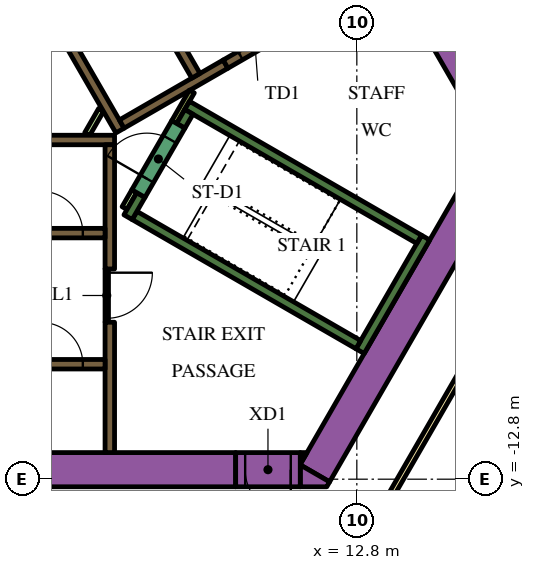
"""IFC4 building model, lengths in metres.
Left out: names, types, materials, properties, quantities, classifications, styles, units other than length and angle.
Written with IfcOpenShell. Run it as: python <this file> out.ifc"""

import sys

from ifc_helpers import new_model, si_unit, direction, frame, frame_2d, origin, place, context, subcontext, project, spatial, polyline, rectangle, outline, extrude, element, fill, save


model = new_model("IFC4")
c1 = context("Model", 3, precision=1e-05, world=origin(), true_north=direction((0.0, 1.0)))
c2 = subcontext(c1, "Body", "Model", "MODEL_VIEW")
j1 = project(units=[si_unit("LENGTHUNIT", "METRE"), si_unit("PLANEANGLEUNIT", "RADIAN")], contexts=[c1])
p1 = place(None, origin())
s1 = spatial("IfcSite", under=j1, at=p1, CompositionType="ELEMENT")
p2 = place(p1, origin())
s2 = spatial("IfcBuilding", under=s1, at=p2, CompositionType="ELEMENT")
p3 = place(p2, frame((0.0, 0.0, 107.1)))
s3 = spatial("IfcBuildingStorey", under=s2, at=p3, CompositionType="ELEMENT", Elevation=107.1)
p4 = place(p3, frame((6.711, 13.476, 0.0), z_axis=(0.0, 0.0, 1.0), x_axis=(0.500002723396, -0.866023831425, 0.0)))
e1 = element("IfcWall", 1, at=p4, inside=s3, PredefinedType="SOLIDWALL", context=c2, shape_type="SweptSolid", body=[
    extrude(rectangle(XDim=20.334, YDim=0.9, at=frame_2d((10.167, 0.0))), origin(), (0.0, 0.0, 1.0), 3.9),
])
p5 = place(p3, frame((11.695, -12.644, 0.0), z_axis=(0.0, 0.0, 1.0), x_axis=(0.500010229568, 0.86601949766, 0.0)))
e2 = element("IfcWall", 2, at=p5, inside=s3, PredefinedType="SOLIDWALL", context=c2, shape_type="SweptSolid", body=[
    extrude(rectangle(XDim=9.326, YDim=0.9, at=frame_2d((4.663, 0.0))), origin(), (0.0, 0.0, 1.0), 3.9),
])
p6 = place(p3, origin())
e3 = element("IfcWall", 3, at=p6, inside=s3, PredefinedType="SOLIDWALL", context=c2, shape_type="SweptSolid", body=[
    extrude(outline(polyline([(12.009, -13.0), (11.312, -13.0), (11.312, -12.425), (12.083, -12.871), (12.009, -13.0)])), origin(), (0.0, 0.0, 1.0), 3.9),
])
e4 = element("IfcWall", 4, at=p6, inside=s3, PredefinedType="SOLIDWALL", context=c2, shape_type="SweptSolid", body=[
    extrude(outline(polyline([(11.489, -12.1), (11.312, -12.407), (11.312, -12.1), (11.489, -12.1)])), origin(), (0.0, 0.0, 1.0), 3.9),
])
p7 = place(p3, frame((-12.019, -12.55, 0.0), z_axis=(0.0, 0.0, 1.0), x_axis=(1.0, 0.0, 0.0)))
e5 = element("IfcWall", 5, at=p7, inside=s3, PredefinedType="SOLIDWALL", context=c2, shape_type="SweptSolid", body=[
    extrude(rectangle(XDim=21.63, YDim=0.9, at=frame_2d((10.815, 0.0))), origin(), (0.0, 0.0, 1.0), 3.9),
])
p8 = place(p3, frame((12.885, -9.431, 0.0), z_axis=(0.0, 0.0, 1.0), x_axis=(0.500020560727, 0.866013532718, 0.0)))
e6 = element("IfcWall", 6, at=p8, inside=s3, PredefinedType="SOLIDWALL", context=c2, shape_type="SweptSolid", body=[
    extrude(rectangle(XDim=3.45, YDim=0.25, at=frame_2d((1.725, 0.0))), origin(), (0.0, 0.0, 1.0), 3.9),
])
p9 = place(p3, frame((12.84, -9.261, 0.0), z_axis=(0.0, 0.0, 1.0), x_axis=(-0.866013990052, 0.500019768644, 0.0)))
e7 = element("IfcWall", 7, at=p9, inside=s3, PredefinedType="SOLIDWALL", context=c2, shape_type="SweptSolid", body=[
    extrude(rectangle(XDim=6.8, YDim=0.25, at=frame_2d((3.4, 0.0))), origin(), (0.0, 0.0, 1.0), 3.9),
])
p10 = place(p3, frame((6.78, -5.906, 0.0), z_axis=(0.0, 0.0, 1.0), x_axis=(0.500223362819, 0.865896406789, 0.0)))
e8 = element("IfcWall", 8, at=p10, inside=s3, PredefinedType="SOLIDWALL", context=c2, shape_type="SweptSolid", body=[
    extrude(rectangle(XDim=0.675, YDim=0.25, at=frame_2d((0.337, 0.0))), origin(), (0.0, 0.0, 1.0), 3.9),
])
p11 = place(p3, frame((8.334, -2.964, 0.0), z_axis=(0.0, 0.0, 1.0), x_axis=(0.866016039709, -0.500016218704, 0.0)))
e9 = element("IfcWall", 9, at=p11, inside=s3, PredefinedType="SOLIDWALL", context=c2, shape_type="SweptSolid", body=[
    extrude(rectangle(XDim=7.05, YDim=0.25, at=frame_2d((3.525, 0.0))), origin(), (0.0, 0.0, 1.0), 3.9),
])
p12 = place(p3, frame((8.168, -3.503, 0.0), z_axis=(0.0, 0.0, 1.0), x_axis=(0.49972245349, 0.866185586049, 0.0)))
e10 = element("IfcWall", 10, at=p12, inside=s3, PredefinedType="SOLIDWALL", context=c2, shape_type="SweptSolid", body=[
    extrude(rectangle(XDim=0.425, YDim=0.25, at=frame_2d((0.212, 0.0))), origin(), (0.0, 0.0, 1.0), 3.9),
])
p13 = place(p3, frame((-5.545, -3.875, 0.0), z_axis=(0.0, 0.0, 1.0), x_axis=(1.0, 0.0, 0.0)))
e11 = element("IfcWall", 11, at=p13, inside=s3, PredefinedType="SOLIDWALL", context=c2, shape_type="SweptSolid", body=[
    extrude(rectangle(XDim=11.97, YDim=0.25, at=frame_2d((5.985, 0.0))), origin(), (0.0, 0.0, 1.0), 3.9),
])
p14 = place(p3, frame((6.3, -8.67, 0.0), z_axis=(0.0, 0.0, 1.0), x_axis=(0.0, -1.0, 0.0)))
e12 = element("IfcWall", 12, at=p14, inside=s3, PredefinedType="SOLIDWALL", context=c2, shape_type="SweptSolid", body=[
    extrude(rectangle(XDim=3.43, YDim=0.25, at=frame_2d((1.715, 0.0))), origin(), (0.0, 0.0, 1.0), 3.9),
])
p15 = place(p3, frame((6.3, -7.268, 0.0), z_axis=(0.0, 0.0, 1.0), x_axis=(0.0, 1.0, 0.0)))
e13 = element("IfcWall", 13, at=p15, inside=s3, PredefinedType="SOLIDWALL", context=c2, shape_type="SweptSolid", body=[
    extrude(rectangle(XDim=3.268, YDim=0.25, at=frame_2d((1.634, 0.0))), origin(), (0.0, 0.0, 1.0), 3.9),
])
e14 = element("IfcWall", 14, at=p6, inside=s3, PredefinedType="SOLIDWALL", context=c2, shape_type="SweptSolid", body=[
    extrude(outline(polyline([(0.566, 6.725), (0.566, 6.875), (0.566, 6.875), (0.565, 6.875), (0.361, 6.875), (0.035, 7.439), (0.252, 7.564), (0.377, 7.348), (6.552, -3.348), (6.677, -3.564), (6.46, -3.689), (0.448, 6.725), (0.565, 6.725), (0.566, 6.725), (0.566, 6.725)])), origin(), (0.0, 0.0, 1.0), 3.9),
])
p16 = place(p3, frame((6.614, -3.456, 0.0), z_axis=(0.0, 0.0, 1.0), x_axis=(0.86602447079, 0.500001615989, 0.0)))
e15 = element("IfcWall", 15, at=p16, inside=s3, PredefinedType="SOLIDWALL", context=c2, shape_type="SweptSolid", body=[
    extrude(rectangle(XDim=3.154, YDim=0.25, at=frame_2d((1.577, 0.0))), origin(), (0.0, 0.0, 1.0), 3.9),
])
p17 = place(p3, frame((6.945, -5.222, 0.0), z_axis=(0.0, 0.0, 1.0), x_axis=(-0.499818422106, -0.866130212453, 0.0)))
e16 = element("IfcWall", 16, at=p17, inside=s3, PredefinedType="PARTITIONING", context=c2, shape_type="SweptSolid", body=[
    extrude(rectangle(XDim=0.514, YDim=0.15, at=frame_2d((0.257, 0.0))), origin(), (0.0, 0.0, 1.0), 2.75),
])
p18 = place(p3, frame((5.705, -3.718, 0.0), z_axis=(0.0, 0.0, 1.0), x_axis=(0.499962090823, 0.866047289552, 0.0)))
e17 = element("IfcWall", 17, at=p18, inside=s3, PredefinedType="PARTITIONING", context=c2, shape_type="SweptSolid", body=[
    extrude(rectangle(XDim=0.735, YDim=0.15, at=frame_2d((0.367, 0.0))), origin(), (0.0, 0.0, 1.0), 2.75),
])
p19 = place(p3, frame((8.459, -2.599, 0.0), z_axis=(0.0, 0.0, 1.0), x_axis=(-0.500041054325, -0.866001699761, 0.0)))
e18 = element("IfcWall", 18, at=p19, inside=s3, PredefinedType="PARTITIONING", context=c2, shape_type="SweptSolid", body=[
    extrude(rectangle(XDim=0.929, YDim=0.15, at=frame_2d((0.464, 0.0))), origin(), (0.0, 0.0, 1.0), 3.9),
])
p20 = place(p3, frame((-6.175, -9.775, 0.0), z_axis=(0.0, 0.0, 1.0), x_axis=(1.0, 0.0, 0.0)))
e19 = element("IfcWall", 19, at=p20, inside=s3, PredefinedType="SOLIDWALL", context=c2, shape_type="SweptSolid", body=[
    extrude(rectangle(XDim=12.35, YDim=0.25, at=frame_2d((6.175, 0.0))), origin(), (0.0, 0.0, 1.0), 3.9),
])
p21 = place(p20, frame((0.585, 0.0, 0.0)))
e20 = element("IfcOpeningElement", 20, at=p21, cuts=e19, PredefinedType="OPENING", context=c2, shape_type="SweptSolid", body=[
    extrude(rectangle(XDim=1.1, YDim=2.1, at=frame_2d((0.55, 1.05))), frame((0.0, 0.135, 0.0), z_axis=(0.0, -1.0, 0.0), x_axis=(1.0, 0.0, 0.0)), (0.0, 0.0, 1.0), 0.27),
])
p22 = place(p20, frame((3.105, 0.0, 0.0)))
e21 = element("IfcOpeningElement", 21, at=p22, cuts=e19, PredefinedType="OPENING", context=c2, shape_type="SweptSolid", body=[
    extrude(rectangle(XDim=1.1, YDim=2.1, at=frame_2d((0.55, 1.05))), frame((0.0, 0.135, 0.0), z_axis=(0.0, -1.0, 0.0), x_axis=(1.0, 0.0, 0.0)), (0.0, 0.0, 1.0), 0.27),
])
p23 = place(p20, frame((5.625, 0.0, 0.0)))
e22 = element("IfcOpeningElement", 22, at=p23, cuts=e19, PredefinedType="OPENING", context=c2, shape_type="SweptSolid", body=[
    extrude(rectangle(XDim=1.1, YDim=2.1, at=frame_2d((0.55, 1.05))), frame((0.0, 0.135, 0.0), z_axis=(0.0, -1.0, 0.0), x_axis=(1.0, 0.0, 0.0)), (0.0, 0.0, 1.0), 0.27),
])
p24 = place(p20, frame((8.145, 0.0, 0.0)))
e23 = element("IfcOpeningElement", 23, at=p24, cuts=e19, PredefinedType="OPENING", context=c2, shape_type="SweptSolid", body=[
    extrude(rectangle(XDim=1.1, YDim=2.1, at=frame_2d((0.55, 1.05))), frame((0.0, 0.135, 0.0), z_axis=(0.0, -1.0, 0.0), x_axis=(1.0, 0.0, 0.0)), (0.0, 0.0, 1.0), 0.27),
])
p25 = place(p20, frame((10.665, 0.0, 0.0)))
e24 = element("IfcOpeningElement", 24, at=p25, cuts=e19, PredefinedType="OPENING", context=c2, shape_type="SweptSolid", body=[
    extrude(rectangle(XDim=1.1, YDim=2.1, at=frame_2d((0.55, 1.05))), frame((0.0, 0.135, 0.0), z_axis=(0.0, -1.0, 0.0), x_axis=(1.0, 0.0, 0.0)), (0.0, 0.0, 1.0), 0.27),
])
p26 = place(p3, frame((-6.175, -6.325, 0.0), z_axis=(0.0, 0.0, 1.0), x_axis=(1.0, 0.0, 0.0)))
e25 = element("IfcWall", 25, at=p26, inside=s3, PredefinedType="SOLIDWALL", context=c2, shape_type="SweptSolid", body=[
    extrude(rectangle(XDim=12.35, YDim=0.25, at=frame_2d((6.175, 0.0))), origin(), (0.0, 0.0, 1.0), 3.9),
])
p27 = place(p26, frame((3.205, 0.0, 0.0)))
e26 = element("IfcOpeningElement", 26, at=p27, cuts=e25, PredefinedType="OPENING", context=c2, shape_type="SweptSolid", body=[
    extrude(rectangle(XDim=0.9, YDim=2.1, at=frame_2d((0.45, 1.05))), frame((0.0, 0.135, 0.0), z_axis=(0.0, -1.0, 0.0), x_axis=(1.0, 0.0, 0.0)), (0.0, 0.0, 1.0), 0.27),
])
p28 = place(p26, frame((8.145, 0.0, 0.0)))
e27 = element("IfcOpeningElement", 27, at=p28, cuts=e25, PredefinedType="OPENING", context=c2, shape_type="SweptSolid", body=[
    extrude(rectangle(XDim=1.1, YDim=2.1, at=frame_2d((0.55, 1.05))), frame((0.0, 0.135, 0.0), z_axis=(0.0, -1.0, 0.0), x_axis=(1.0, 0.0, 0.0)), (0.0, 0.0, 1.0), 0.27),
])
p29 = place(p26, frame((10.665, 0.0, 0.0)))
e28 = element("IfcOpeningElement", 28, at=p29, cuts=e25, PredefinedType="OPENING", context=c2, shape_type="SweptSolid", body=[
    extrude(rectangle(XDim=1.1, YDim=2.1, at=frame_2d((0.55, 1.05))), frame((0.0, 0.135, 0.0), z_axis=(0.0, -1.0, 0.0), x_axis=(1.0, 0.0, 0.0)), (0.0, 0.0, 1.0), 0.27),
])
p30 = place(p3, frame((8.565, -2.185, 0.0), z_axis=(0.0, 0.0, 1.0), x_axis=(-0.499997954832, 0.866026584559, 0.0)))
e29 = element("IfcWall", 29, at=p30, inside=s3, PredefinedType="SOLIDWALL", context=c2, shape_type="SweptSolid", body=[
    extrude(rectangle(XDim=12.35, YDim=0.25, at=frame_2d((6.175, 0.0))), origin(), (0.0, 0.0, 1.0), 3.9),
])
p31 = place(p30, frame((5.725, 0.0, 0.0)))
e30 = element("IfcOpeningElement", 30, at=p31, cuts=e29, PredefinedType="OPENING", context=c2, shape_type="SweptSolid", body=[
    extrude(rectangle(XDim=0.9, YDim=2.1, at=frame_2d((0.45, 1.05))), frame((0.0, 0.135, 0.0), z_axis=(0.0, -1.0, 0.0), x_axis=(1.0, 0.0, 0.0)), (0.0, 0.0, 1.0), 0.27),
])
p32 = place(p3, frame((7.053, -5.284, 0.0), z_axis=(0.0, 0.0, 1.0), x_axis=(0.500078061341, 0.865980330357, 0.0)))
e31 = element("IfcWall", 31, at=p32, inside=s3, PredefinedType="SOLIDWALL", context=c2, shape_type="SweptSolid", body=[
    extrude(rectangle(XDim=2.1, YDim=0.4, at=frame_2d((1.05, 0.0))), origin(), (0.0, 0.0, 1.0), 3.9),
])
p33 = place(p32, frame((0.45, 0.0, 0.0)))
e32 = element("IfcOpeningElement", 32, at=p33, cuts=e31, PredefinedType="OPENING", context=c2, shape_type="SweptSolid", body=[
    extrude(rectangle(XDim=1.2, YDim=2.1, at=frame_2d((0.6, 1.05))), frame((0.0, 0.21, 0.0), z_axis=(0.0, -1.0, 0.0), x_axis=(1.0, 0.0, 0.0)), (0.0, 0.0, 1.0), 0.42),
])
p34 = place(p3, frame((9.346, -1.879, 0.0), z_axis=(0.0, 0.0, 1.0), x_axis=(0.866047807691, 0.499961193289, 0.0)))
e33 = element("IfcWall", 33, at=p34, inside=s3, PredefinedType="SOLIDWALL", context=c2, shape_type="SweptSolid", body=[
    extrude(rectangle(XDim=1.8, YDim=0.25, at=frame_2d((0.9, 0.0))), origin(), (0.0, 0.0, 1.0), 3.9),
])
p35 = place(p34, frame((0.45, 0.0, 0.0)))
e34 = element("IfcOpeningElement", 34, at=p35, cuts=e33, PredefinedType="OPENING", context=c2, shape_type="SweptSolid", body=[
    extrude(rectangle(XDim=0.9, YDim=2.1, at=frame_2d((0.45, 1.05))), frame((0.0, 0.135, 0.0), z_axis=(0.0, -1.0, 0.0), x_axis=(1.0, 0.0, 0.0)), (0.0, 0.0, 1.0), 0.27),
])
p36 = place(p3, frame((6.22, -7.266, 0.0), z_axis=(0.0, 0.0, 1.0), x_axis=(0.0, -1.0, 0.0)))
e35 = element("IfcWall", 35, at=p36, inside=s3, PredefinedType="PARTITIONING", context=c2, shape_type="SweptSolid", body=[
    extrude(rectangle(XDim=1.4, YDim=0.09, at=frame_2d((0.7, 0.0))), origin(), (0.0, 0.0, 1.0), 2.75),
])
p37 = place(p36, frame((0.1, 0.0, 0.0)))
e36 = element("IfcOpeningElement", 36, at=p37, cuts=e35, PredefinedType="OPENING", context=c2, shape_type="SweptSolid", body=[
    extrude(rectangle(XDim=1.2, YDim=2.1, at=frame_2d((0.6, 1.05))), frame((0.0, 0.055, 0.0), z_axis=(0.0, -1.0, 0.0), x_axis=(1.0, 0.0, 0.0)), (0.0, 0.0, 1.0), 0.11),
])
p38 = place(p3, frame((11.312, -12.55, 0.0), z_axis=(0.0, 0.0, 1.0), x_axis=(-1.0, 0.0, 0.0)))
e37 = element("IfcWall", 37, at=p38, inside=s3, PredefinedType="SOLIDWALL", context=c2, shape_type="SweptSolid", body=[
    extrude(rectangle(XDim=1.7, YDim=0.9, at=frame_2d((0.85, 0.0))), origin(), (0.0, 0.0, 1.0), 3.9),
])
p39 = place(p38, frame((0.25, 0.0, 0.0)))
e38 = element("IfcOpeningElement", 38, at=p39, cuts=e37, PredefinedType="OPENING", context=c2, shape_type="SweptSolid", body=[
    extrude(rectangle(XDim=1.2, YDim=2.1, at=frame_2d((0.6, 1.05))), frame((0.0, 0.46, 0.0), z_axis=(0.0, -1.0, 0.0), x_axis=(1.0, 0.0, 0.0)), (0.0, 0.0, 1.0), 0.92),
])
p40 = place(p3, frame((6.163, 18.475, 0.0), z_axis=(0.0, 0.0, 1.0), x_axis=(0.500001317485, -0.866024643133, 0.0)))
e39 = element("IfcWall", 39, at=p40, inside=s3, PredefinedType="PARTITIONING", context=c2, shape_type="SweptSolid", body=[
    extrude(rectangle(XDim=25.767, YDim=0.15, at=frame_2d((12.883, 0.0))), origin(), (0.0, 0.0, 1.0), 2.75),
])
p41 = place(p40, frame((24.241, 0.0, 0.0)))
e40 = element("IfcOpeningElement", 40, at=p41, cuts=e39, PredefinedType="OPENING", context=c2, shape_type="SweptSolid", body=[
    extrude(rectangle(XDim=1.0, YDim=2.1, at=frame_2d((0.5, 1.05))), frame((0.0, 0.085, 0.0), z_axis=(0.0, -1.0, 0.0), x_axis=(1.0, 0.0, 0.0)), (0.0, 0.0, 1.0), 0.17),
])
p42 = place(p40, frame((13.144, 0.0, 0.0)))
e41 = element("IfcOpeningElement", 41, at=p42, cuts=e39, PredefinedType="OPENING", context=c2, shape_type="SweptSolid", body=[
    extrude(rectangle(XDim=1.0, YDim=2.1, at=frame_2d((0.5, 1.05))), frame((0.0, 0.085, 0.0), z_axis=(0.0, -1.0, 0.0), x_axis=(1.0, 0.0, 0.0)), (0.0, 0.0, 1.0), 0.17),
])
p43 = place(p40, frame((10.874, 0.0, 0.0)))
e42 = element("IfcOpeningElement", 42, at=p43, cuts=e39, PredefinedType="OPENING", context=c2, shape_type="SweptSolid", body=[
    extrude(rectangle(XDim=0.9, YDim=2.1, at=frame_2d((0.45, 1.05))), frame((0.0, 0.085, 0.0), z_axis=(0.0, -1.0, 0.0), x_axis=(1.0, 0.0, 0.0)), (0.0, 0.0, 1.0), 0.17),
])
p44 = place(p40, frame((3.718, 0.0, 0.0)))
e43 = element("IfcOpeningElement", 43, at=p44, cuts=e39, PredefinedType="OPENING", context=c2, shape_type="SweptSolid", body=[
    extrude(rectangle(XDim=1.0, YDim=2.1, at=frame_2d((0.5, 1.05))), frame((0.0, 0.085, 0.0), z_axis=(0.0, -1.0, 0.0), x_axis=(1.0, 0.0, 0.0)), (0.0, 0.0, 1.0), 0.17),
])
p45 = place(p40, frame((2.411, 0.0, 0.0)))
e44 = element("IfcOpeningElement", 44, at=p45, cuts=e39, PredefinedType="OPENING", context=c2, shape_type="SweptSolid", body=[
    extrude(rectangle(XDim=1.0, YDim=2.1, at=frame_2d((0.5, 1.05))), frame((0.0, 0.085, 0.0), z_axis=(0.0, -1.0, 0.0), x_axis=(1.0, 0.0, 0.0)), (0.0, 0.0, 1.0), 0.17),
])
p46 = place(p3, frame((15.587, -9.952, 0.0), z_axis=(0.0, 0.0, 1.0), x_axis=(-0.500016618951, -0.866015808616, 0.0)))
e45 = element("IfcWall", 45, at=p46, inside=s3, PredefinedType="PARTITIONING", context=c2, shape_type="SweptSolid", body=[
    extrude(rectangle(XDim=5.268, YDim=0.15, at=frame_2d((2.634, 0.0))), origin(), (0.0, 0.0, 1.0), 2.75),
])
p47 = place(p25, origin())
e46 = element("IfcDoor", 46, at=p47, inside=s3, OperationType="DOUBLE_DOOR_SLIDING", PredefinedType="DOOR", context=c2, shape_type="SweptSolid", body=[
    extrude(rectangle(XDim=1.1, YDim=2.1, at=frame_2d((0.55, 1.05))), frame((0.0, 0.025, 0.0), z_axis=(0.0, -1.0, 0.0), x_axis=(1.0, 0.0, 0.0)), (0.0, 0.0, 1.0), 0.05),
])
fill(e24, e46)
p48 = place(p29, origin())
e47 = element("IfcDoor", 47, at=p48, inside=s3, OperationType="DOUBLE_DOOR_SLIDING", PredefinedType="DOOR", context=c2, shape_type="SweptSolid", body=[
    extrude(rectangle(XDim=1.1, YDim=2.1, at=frame_2d((0.55, 1.05))), frame((0.0, 0.025, 0.0), z_axis=(0.0, -1.0, 0.0), x_axis=(1.0, 0.0, 0.0)), (0.0, 0.0, 1.0), 0.05),
])
fill(e28, e47)
p49 = place(p33, origin())
e48 = element("IfcDoor", 48, at=p49, inside=s3, OperationType="SINGLE_SWING_LEFT", PredefinedType="DOOR", context=c2, shape_type="SweptSolid", body=[
    extrude(rectangle(XDim=1.2, YDim=2.1, at=frame_2d((0.6, 1.05))), frame((0.0, 0.025, 0.0), z_axis=(0.0, -1.0, 0.0), x_axis=(1.0, 0.0, 0.0)), (0.0, 0.0, 1.0), 0.05),
])
fill(e32, e48)
p50 = place(p35, origin())
e49 = element("IfcDoor", 49, at=p50, inside=s3, OperationType="SINGLE_SWING_LEFT", PredefinedType="DOOR", context=c2, shape_type="SweptSolid", body=[
    extrude(rectangle(XDim=0.9, YDim=2.1, at=frame_2d((0.45, 1.05))), frame((0.0, 0.025, 0.0), z_axis=(0.0, -1.0, 0.0), x_axis=(1.0, 0.0, 0.0)), (0.0, 0.0, 1.0), 0.05),
])
fill(e34, e49)
p51 = place(p37, origin())
e50 = element("IfcDoor", 50, at=p51, inside=s3, OperationType="SINGLE_SWING_LEFT", PredefinedType="DOOR", context=c2, shape_type="SweptSolid", body=[
    extrude(rectangle(XDim=1.2, YDim=2.1, at=frame_2d((0.6, 1.05))), frame((0.0, 0.025, 0.0), z_axis=(0.0, -1.0, 0.0), x_axis=(1.0, 0.0, 0.0)), (0.0, 0.0, 1.0), 0.05),
])
fill(e36, e50)
p52 = place(p39, origin())
e51 = element("IfcDoor", 51, at=p52, inside=s3, OperationType="SINGLE_SWING_LEFT", PredefinedType="DOOR", context=c2, shape_type="SweptSolid", body=[
    extrude(rectangle(XDim=1.2, YDim=2.1, at=frame_2d((0.6, 1.05))), frame((0.0, 0.025, 0.0), z_axis=(0.0, -1.0, 0.0), x_axis=(1.0, 0.0, 0.0)), (0.0, 0.0, 1.0), 0.05),
])
fill(e38, e51)
save(model, sys.argv[1])
